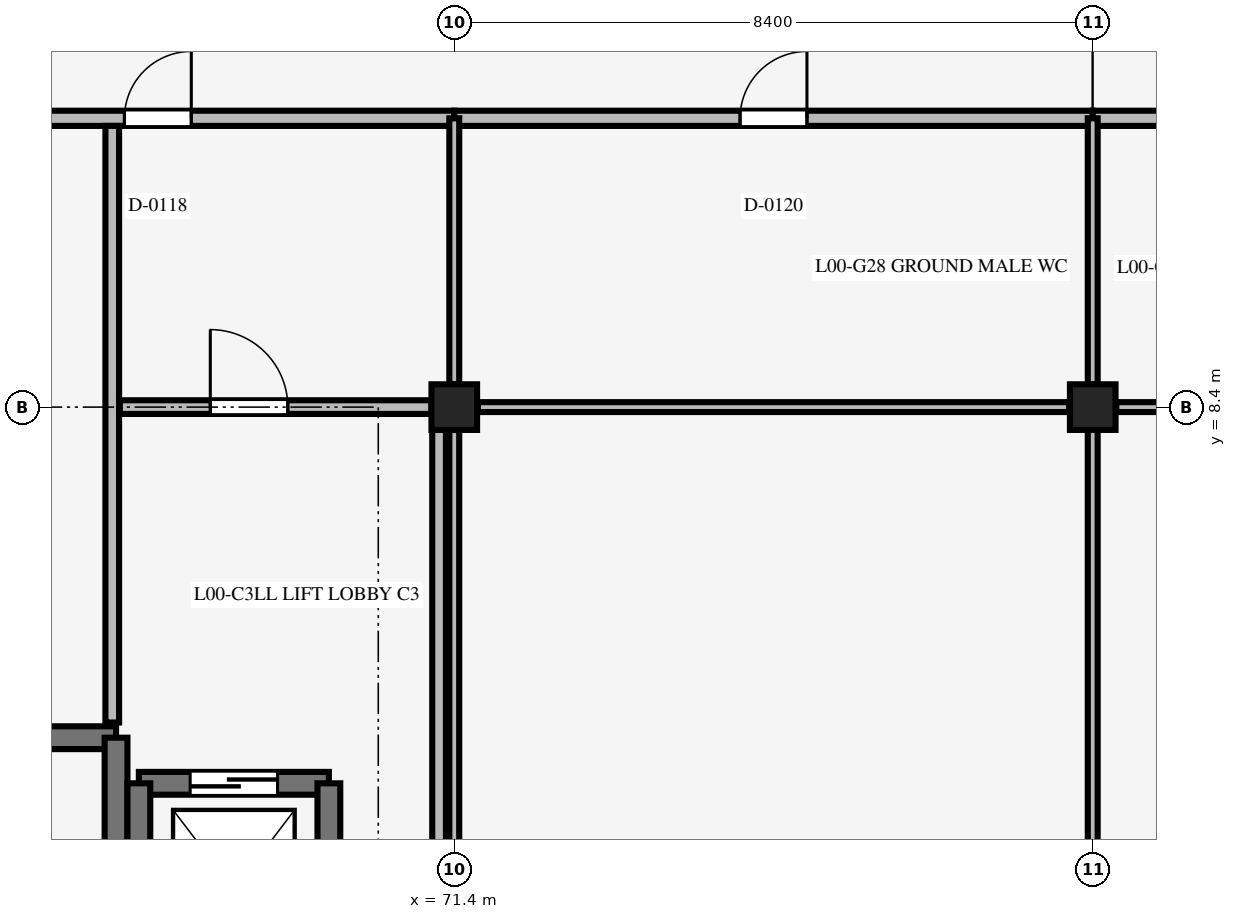
"""IFC4 building model, lengths in metres.
Left out: names, types, materials, properties, quantities, classifications, styles, units other than length and angle.
Written with IfcOpenShell. Run it as: python <this file> out.ifc"""

import sys

from ifc_helpers import new_model, si_unit, direction, frame, frame_2d, origin, origin_2d, place, context, subcontext, project, spatial, rectangle, extrude, element, fill, save


model = new_model("IFC4")
c1 = context("Model", 3, precision=1e-05, world=origin(), true_north=direction((0.0, 1.0)))
c2 = subcontext(c1, "Body", "Model", "MODEL_VIEW")
j1 = project(units=[si_unit("LENGTHUNIT", "METRE"), si_unit("PLANEANGLEUNIT", "RADIAN")], contexts=[c1])
p1 = place(None, origin())
s1 = spatial("IfcSite", under=j1, at=p1, CompositionType="ELEMENT")
p2 = place(p1, origin())
s2 = spatial("IfcBuilding", under=s1, at=p2, CompositionType="ELEMENT")
p3 = place(p2, origin())
s3 = spatial("IfcBuildingStorey", under=s2, at=p3, CompositionType="ELEMENT", Elevation=0.0)
for number, where, z_axis, x_axis in (
    (1, (71.4, 8.4, 0.0), (0.0, 0.0, 1.0), (1.0, 0.0, 0.0)),
    (2, (79.8, 8.4, 0.0), (0.0, 0.0, 1.0), (1.0, 0.0, 0.0)),
):
    element("IfcColumn", number, at=place(p3, frame(where, z_axis=z_axis, x_axis=x_axis)), inside=s3, PredefinedType="COLUMN", context=c2, shape_type="SweptSolid", body=[
        extrude(rectangle(XDim=0.6, YDim=0.6, at=origin_2d()), origin(), (0.0, 0.0, 1.0), 6.0),
    ])
p4 = place(p3, frame((57.45, 4.05, 0.0), z_axis=(0.0, 0.0, 1.0), x_axis=(1.0, 0.0, 0.0)))
e3 = element("IfcWall", 3, at=p4, inside=s3, PredefinedType="SHEAR", context=c2, shape_type="SweptSolid", body=[
    extrude(rectangle(XDim=9.5, YDim=0.3, at=frame_2d((4.75, 0.0))), origin(), (0.0, 0.0, 1.0), 6.0),
])
p5 = place(p3, frame((66.95, 0.25, 0.0), z_axis=(0.0, 0.0, 1.0), x_axis=(0.0, 1.0, 0.0)))
e4 = element("IfcWall", 4, at=p5, inside=s3, PredefinedType="SHEAR", context=c2, shape_type="SweptSolid", body=[
    extrude(rectangle(XDim=3.8, YDim=0.3, at=frame_2d((1.9, 0.0))), origin(), (0.0, 0.0, 1.0), 6.0),
])
p6 = place(p3, frame((67.25, 3.45, 0.0), z_axis=(0.0, 0.0, 1.0), x_axis=(1.0, 0.0, 0.0)))
e5 = element("IfcWall", 5, at=p6, inside=s3, PredefinedType="SHEAR", context=c2, shape_type="SweptSolid", body=[
    extrude(rectangle(XDim=2.5, YDim=0.3, at=frame_2d((1.25, 0.0))), origin(), (0.0, 0.0, 1.0), 5.66),
])
p7 = place(p6, frame((0.675, 0.0, 0.0)))
e6 = element("IfcOpeningElement", 6, at=p7, cuts=e5, PredefinedType="OPENING", context=c2, shape_type="SweptSolid", body=[
    extrude(rectangle(XDim=1.15, YDim=2.2, at=frame_2d((0.575, 1.1))), frame((0.0, 0.16, 0.0), z_axis=(0.0, -1.0, 0.0), x_axis=(1.0, 0.0, 0.0)), (0.0, 0.0, 1.0), 0.32),
])
for number, where, z_axis, x_axis in (
    (7, (67.25, 0.65, 0.0), (0.0, 0.0, 1.0), (0.0, 1.0, 0.0)),
    (8, (69.75, 0.65, 0.0), (0.0, 0.0, 1.0), (0.0, 1.0, 0.0)),
):
    element("IfcWall", number, at=place(p3, frame(where, z_axis=z_axis, x_axis=x_axis)), inside=s3, PredefinedType="SHEAR", context=c2, shape_type="SweptSolid", body=[
        extrude(rectangle(XDim=2.8, YDim=0.3, at=frame_2d((1.4, 0.0))), origin(), (0.0, 0.0, 1.0), 5.66),
    ])
p8 = place(p3, frame((63.0, 12.2, 0.0), z_axis=(0.0, 0.0, 1.0), x_axis=(1.0, 0.0, 0.0)))
e9 = element("IfcWall", 9, at=p8, inside=s3, PredefinedType="STANDARD", context=c2, shape_type="SweptSolid", body=[
    extrude(rectangle(XDim=8.4, YDim=0.2, at=frame_2d((4.2, 0.0))), origin(), (0.0, 0.0, 1.0), 3.05),
])
p9 = place(p8, frame((4.06, 0.0, 0.0)))
e10 = element("IfcOpeningElement", 10, at=p9, cuts=e9, PredefinedType="OPENING", context=c2, shape_type="SweptSolid", body=[
    extrude(rectangle(XDim=0.88, YDim=2.1, at=frame_2d((0.44, 1.05))), frame((0.0, 0.11, 0.0), z_axis=(0.0, -1.0, 0.0), x_axis=(1.0, 0.0, 0.0)), (0.0, 0.0, 1.0), 0.22),
])
p10 = place(p3, frame((71.4, 12.2, 0.0), z_axis=(0.0, 0.0, 1.0), x_axis=(1.0, 0.0, 0.0)))
e11 = element("IfcWall", 11, at=p10, inside=s3, PredefinedType="STANDARD", context=c2, shape_type="SweptSolid", body=[
    extrude(rectangle(XDim=8.4, YDim=0.2, at=frame_2d((4.2, 0.0))), origin(), (0.0, 0.0, 1.0), 3.05),
])
p11 = place(p10, frame((3.76, 0.0, 0.0)))
e12 = element("IfcOpeningElement", 12, at=p11, cuts=e11, PredefinedType="OPENING", context=c2, shape_type="SweptSolid", body=[
    extrude(rectangle(XDim=0.88, YDim=2.1, at=frame_2d((0.44, 1.05))), frame((0.0, 0.11, 0.0), z_axis=(0.0, -1.0, 0.0), x_axis=(1.0, 0.0, 0.0)), (0.0, 0.0, 1.0), 0.22),
])
p12 = place(p3, frame((79.8, 12.2, 0.0), z_axis=(0.0, 0.0, 1.0), x_axis=(1.0, 0.0, 0.0)))
e13 = element("IfcWall", 13, at=p12, inside=s3, PredefinedType="STANDARD", context=c2, shape_type="SweptSolid", body=[
    extrude(rectangle(XDim=9.0, YDim=0.2, at=frame_2d((4.5, 0.0))), origin(), (0.0, 0.0, 1.0), 3.05),
])
p13 = place(p12, frame((4.06, 0.0, 0.0)))
e14 = element("IfcOpeningElement", 14, at=p13, cuts=e13, PredefinedType="OPENING", context=c2, shape_type="SweptSolid", body=[
    extrude(rectangle(XDim=0.88, YDim=2.1, at=frame_2d((0.44, 1.05))), frame((0.0, 0.11, 0.0), z_axis=(0.0, -1.0, 0.0), x_axis=(1.0, 0.0, 0.0)), (0.0, 0.0, 1.0), 0.22),
])
p14 = place(p3, frame((71.4, 0.3, 0.0), z_axis=(0.0, 0.0, 1.0), x_axis=(0.0, 1.0, 0.0)))
e15 = element("IfcWall", 15, at=p14, inside=s3, PredefinedType="STANDARD", context=c2, shape_type="SweptSolid", body=[
    extrude(rectangle(XDim=7.8, YDim=0.13, at=frame_2d((3.9, 0.0))), origin(), (0.0, 0.0, 1.0), 3.05),
])
p15 = place(p3, frame((71.4, 8.7, 0.0), z_axis=(0.0, 0.0, 1.0), x_axis=(0.0, 1.0, 0.0)))
e16 = element("IfcWall", 16, at=p15, inside=s3, PredefinedType="STANDARD", context=c2, shape_type="SweptSolid", body=[
    extrude(rectangle(XDim=3.5, YDim=0.13, at=frame_2d((1.75, 0.0))), origin(), (0.0, 0.0, 1.0), 3.05),
])
p16 = place(p3, frame((79.8, 0.3, 0.0), z_axis=(0.0, 0.0, 1.0), x_axis=(0.0, 1.0, 0.0)))
e17 = element("IfcWall", 17, at=p16, inside=s3, PredefinedType="STANDARD", context=c2, shape_type="SweptSolid", body=[
    extrude(rectangle(XDim=7.8, YDim=0.13, at=frame_2d((3.9, 0.0))), origin(), (0.0, 0.0, 1.0), 3.05),
])
p17 = place(p3, frame((79.8, 8.7, 0.0), z_axis=(0.0, 0.0, 1.0), x_axis=(0.0, 1.0, 0.0)))
e18 = element("IfcWall", 18, at=p17, inside=s3, PredefinedType="STANDARD", context=c2, shape_type="SweptSolid", body=[
    extrude(rectangle(XDim=3.5, YDim=0.13, at=frame_2d((1.75, 0.0))), origin(), (0.0, 0.0, 1.0), 3.05),
])
p18 = place(p3, frame((71.71, 8.4, 0.0), z_axis=(0.0, 0.0, 1.0), x_axis=(1.0, 0.0, 0.0)))
e19 = element("IfcWall", 19, at=p18, inside=s3, PredefinedType="STANDARD", context=c2, shape_type="SweptSolid", body=[
    extrude(rectangle(XDim=7.78, YDim=0.13, at=frame_2d((3.89, 0.0))), origin(), (0.0, 0.0, 1.0), 3.05),
])
p19 = place(p3, frame((80.11, 8.4, 0.0), z_axis=(0.0, 0.0, 1.0), x_axis=(1.0, 0.0, 0.0)))
e20 = element("IfcWall", 20, at=p19, inside=s3, PredefinedType="STANDARD", context=c2, shape_type="SweptSolid", body=[
    extrude(rectangle(XDim=8.38, YDim=0.13, at=frame_2d((4.19, 0.0))), origin(), (0.0, 0.0, 1.0), 3.05),
])
p20 = place(p19, frame((3.76, 0.0, 0.0)))
e21 = element("IfcOpeningElement", 21, at=p20, cuts=e20, PredefinedType="OPENING", context=c2, shape_type="SweptSolid", body=[
    extrude(rectangle(XDim=0.86, YDim=2.1, at=frame_2d((0.43, 1.05))), frame((0.0, 0.075, 0.0), z_axis=(0.0, -1.0, 0.0), x_axis=(1.0, 0.0, 0.0)), (0.0, 0.0, 1.0), 0.15),
])
p21 = place(p3, frame((66.9, 4.25, 0.0), z_axis=(0.0, 0.0, 1.0), x_axis=(0.0, 1.0, 0.0)))
e22 = element("IfcWall", 22, at=p21, inside=s3, PredefinedType="STANDARD", context=c2, shape_type="SweptSolid", body=[
    extrude(rectangle(XDim=7.85, YDim=0.18, at=frame_2d((3.925, 0.0))), origin(), (0.0, 0.0, 1.0), 3.05),
])
p22 = place(p3, frame((67.0, 8.4, 0.0), z_axis=(0.0, 0.0, 1.0), x_axis=(1.0, 0.0, 0.0)))
e23 = element("IfcWall", 23, at=p22, inside=s3, PredefinedType="STANDARD", context=c2, shape_type="SweptSolid", body=[
    extrude(rectangle(XDim=4.1, YDim=0.18, at=frame_2d((2.05, 0.0))), origin(), (0.0, 0.0, 1.0), 3.05),
])
p23 = place(p22, frame((1.19, 0.0, 0.0)))
e24 = element("IfcOpeningElement", 24, at=p23, cuts=e23, PredefinedType="OPENING", context=c2, shape_type="SweptSolid", body=[
    extrude(rectangle(XDim=1.02, YDim=2.15, at=frame_2d((0.51, 1.075))), frame((0.0, 0.1, 0.0), z_axis=(0.0, -1.0, 0.0), x_axis=(1.0, 0.0, 0.0)), (0.0, 0.0, 1.0), 0.2),
])
p24 = place(p3, frame((71.2, 0.3, 0.0), z_axis=(0.0, 0.0, 1.0), x_axis=(0.0, 1.0, 0.0)))
e25 = element("IfcWall", 25, at=p24, inside=s3, PredefinedType="STANDARD", context=c2, shape_type="SweptSolid", body=[
    extrude(rectangle(XDim=8.1, YDim=0.18, at=frame_2d((4.05, 0.0))), origin(), (0.0, 0.0, 1.0), 3.05),
])
p25 = place(p7, origin())
e26 = element("IfcDoor", 26, at=p25, inside=s3, OperationType="DOUBLE_DOOR_SLIDING", PredefinedType="DOOR", context=c2, shape_type="SweptSolid", body=[
    extrude(rectangle(XDim=1.15, YDim=2.2, at=frame_2d((0.575, 1.1))), frame((0.0, 0.025, 0.0), z_axis=(0.0, -1.0, 0.0), x_axis=(1.0, 0.0, 0.0)), (0.0, 0.0, 1.0), 0.05),
])
fill(e6, e26)
p26 = place(p9, origin())
e27 = element("IfcDoor", 27, at=p26, inside=s3, OperationType="SINGLE_SWING_RIGHT", PredefinedType="DOOR", context=c2, shape_type="SweptSolid", body=[
    extrude(rectangle(XDim=0.88, YDim=2.1, at=frame_2d((0.44, 1.05))), frame((0.0, 0.025, 0.0), z_axis=(0.0, -1.0, 0.0), x_axis=(1.0, 0.0, 0.0)), (0.0, 0.0, 1.0), 0.05),
])
fill(e10, e27)
p27 = place(p11, origin())
e28 = element("IfcDoor", 28, at=p27, inside=s3, OperationType="SINGLE_SWING_RIGHT", PredefinedType="DOOR", context=c2, shape_type="SweptSolid", body=[
    extrude(rectangle(XDim=0.88, YDim=2.1, at=frame_2d((0.44, 1.05))), frame((0.0, 0.025, 0.0), z_axis=(0.0, -1.0, 0.0), x_axis=(1.0, 0.0, 0.0)), (0.0, 0.0, 1.0), 0.05),
])
fill(e12, e28)
p28 = place(p23, origin())
e29 = element("IfcDoor", 29, at=p28, inside=s3, OperationType="SINGLE_SWING_LEFT", PredefinedType="DOOR", context=c2, shape_type="SweptSolid", body=[
    extrude(rectangle(XDim=1.02, YDim=2.15, at=frame_2d((0.51, 1.075))), frame((0.0, 0.025, 0.0), z_axis=(0.0, -1.0, 0.0), x_axis=(1.0, 0.0, 0.0)), (0.0, 0.0, 1.0), 0.05),
])
fill(e24, e29)
save(model, sys.argv[1])
